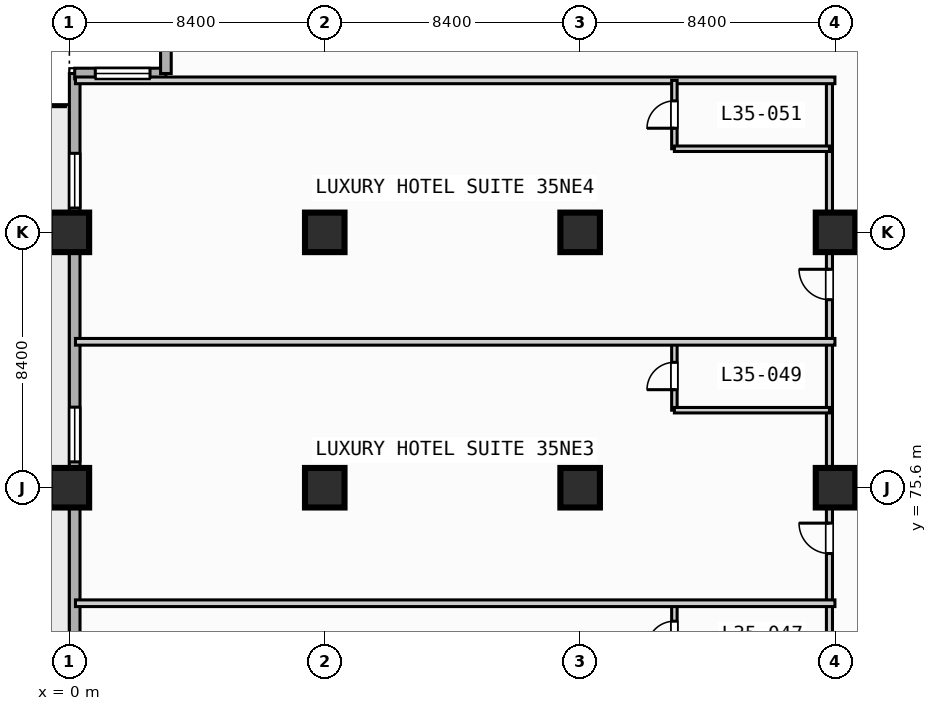
"""IFC4 building model, lengths in metres.
Left out: names, types, materials, properties, quantities, classifications, styles, units other than length and angle.
Written with IfcOpenShell. Run it as: python <this file> out.ifc"""

import sys

from ifc_helpers import new_model, si_unit, direction, frame, frame_2d, origin, origin_2d, place, context, subcontext, project, spatial, rectangle, extrude, element, fill, save


model = new_model("IFC4")
c1 = context("Model", 3, precision=1e-05, world=origin(), true_north=direction((0.0, 1.0)))
c2 = subcontext(c1, "Body", "Model", "MODEL_VIEW")
j1 = project(units=[si_unit("LENGTHUNIT", "METRE"), si_unit("PLANEANGLEUNIT", "RADIAN")], contexts=[c1])
p1 = place(None, origin())
s1 = spatial("IfcSite", under=j1, at=p1, CompositionType="ELEMENT")
p2 = place(p1, origin())
s2 = spatial("IfcBuilding", under=s1, at=p2, CompositionType="ELEMENT")
p3 = place(p2, frame((0.0, 0.0, 145.6)))
s3 = spatial("IfcBuildingStorey", under=s2, at=p3, CompositionType="ELEMENT", Elevation=145.6)
for number, where, z_axis, x_axis in (
    (1, (0.0, 75.6, 0.0), (0.0, 0.0, 1.0), (1.0, 0.0, 0.0)),
    (2, (0.0, 84.0, 0.0), (0.0, 0.0, 1.0), (1.0, 0.0, 0.0)),
    (3, (8.4, 75.6, 0.0), (0.0, 0.0, 1.0), (1.0, 0.0, 0.0)),
    (4, (8.4, 84.0, 0.0), (0.0, 0.0, 1.0), (1.0, 0.0, 0.0)),
    (5, (16.8, 75.6, 0.0), (0.0, 0.0, 1.0), (1.0, 0.0, 0.0)),
    (6, (16.8, 84.0, 0.0), (0.0, 0.0, 1.0), (1.0, 0.0, 0.0)),
    (7, (25.2, 75.6, 0.0), (0.0, 0.0, 1.0), (1.0, 0.0, 0.0)),
    (8, (25.2, 84.0, 0.0), (0.0, 0.0, 1.0), (1.0, 0.0, 0.0)),
):
    element("IfcColumn", number, at=place(p3, frame(where, z_axis=z_axis, x_axis=x_axis)), inside=s3, PredefinedType="COLUMN", context=c2, shape_type="SweptSolid", body=[
        extrude(rectangle(XDim=1.3, YDim=1.3, at=origin_2d()), origin(), (0.0, 0.0, 1.0), 3.8),
    ])
p4 = place(p3, frame((0.175, 3.175, 0.0), z_axis=(0.0, 0.0, 1.0), x_axis=(0.0, 1.0, 0.0)))
e9 = element("IfcWall", 9, at=p4, inside=s3, PredefinedType="STANDARD", context=c2, shape_type="SweptSolid", body=[
    extrude(rectangle(XDim=86.05, YDim=0.35, at=frame_2d((43.025, 0.0))), origin(), (0.0, 0.0, 1.0), 3.55),
])
p5 = place(p4, frame((42.325, 0.0, 0.0)))
e10 = element("IfcOpeningElement", 10, at=p5, cuts=e9, PredefinedType="OPENING", context=c2, shape_type="SweptSolid", body=[
    extrude(rectangle(XDim=1.4, YDim=2.2, at=frame_2d((0.7, 1.1))), frame((0.0, 0.185, 0.0), z_axis=(0.0, -1.0, 0.0), x_axis=(1.0, 0.0, 0.0)), (0.0, 0.0, 1.0), 0.37),
])
p6 = place(p4, frame((25.125, 0.0, 0.85)))
e11 = element("IfcOpeningElement", 11, at=p6, cuts=e9, PredefinedType="OPENING", context=c2, shape_type="SweptSolid", body=[
    extrude(rectangle(XDim=2.2, YDim=1.8, at=frame_2d((1.1, 0.9))), frame((0.0, 0.185, 0.0), z_axis=(0.0, -1.0, 0.0), x_axis=(1.0, 0.0, 0.0)), (0.0, 0.0, 1.0), 0.37),
])
p7 = place(p4, frame((33.525, 0.0, 0.85)))
e12 = element("IfcOpeningElement", 12, at=p7, cuts=e9, PredefinedType="OPENING", context=c2, shape_type="SweptSolid", body=[
    extrude(rectangle(XDim=2.2, YDim=1.8, at=frame_2d((1.1, 0.9))), frame((0.0, 0.185, 0.0), z_axis=(0.0, -1.0, 0.0), x_axis=(1.0, 0.0, 0.0)), (0.0, 0.0, 1.0), 0.37),
])
p8 = place(p4, frame((58.725, 0.0, 0.85)))
e13 = element("IfcOpeningElement", 13, at=p8, cuts=e9, PredefinedType="OPENING", context=c2, shape_type="SweptSolid", body=[
    extrude(rectangle(XDim=2.2, YDim=1.8, at=frame_2d((1.1, 0.9))), frame((0.0, 0.185, 0.0), z_axis=(0.0, -1.0, 0.0), x_axis=(1.0, 0.0, 0.0)), (0.0, 0.0, 1.0), 0.37),
])
p9 = place(p4, frame((65.125, 0.0, 0.85)))
e14 = element("IfcOpeningElement", 14, at=p9, cuts=e9, PredefinedType="OPENING", context=c2, shape_type="SweptSolid", body=[
    extrude(rectangle(XDim=1.8, YDim=1.8, at=frame_2d((0.9, 0.9))), frame((0.0, 0.185, 0.0), z_axis=(0.0, -1.0, 0.0), x_axis=(1.0, 0.0, 0.0)), (0.0, 0.0, 1.0), 0.37),
])
p10 = place(p4, frame((73.275, 0.0, 0.85)))
e15 = element("IfcOpeningElement", 15, at=p10, cuts=e9, PredefinedType="OPENING", context=c2, shape_type="SweptSolid", body=[
    extrude(rectangle(XDim=1.8, YDim=1.8, at=frame_2d((0.9, 0.9))), frame((0.0, 0.185, 0.0), z_axis=(0.0, -1.0, 0.0), x_axis=(1.0, 0.0, 0.0)), (0.0, 0.0, 1.0), 0.37),
])
p11 = place(p4, frame((81.625, 0.0, 0.85)))
e16 = element("IfcOpeningElement", 16, at=p11, cuts=e9, PredefinedType="OPENING", context=c2, shape_type="SweptSolid", body=[
    extrude(rectangle(XDim=1.8, YDim=1.8, at=frame_2d((0.9, 0.9))), frame((0.0, 0.185, 0.0), z_axis=(0.0, -1.0, 0.0), x_axis=(1.0, 0.0, 0.0)), (0.0, 0.0, 1.0), 0.37),
])
p12 = place(p3, frame((0.175, 89.225, 0.0), z_axis=(0.0, 0.0, 1.0), x_axis=(1.0, 0.0, 0.0)))
e17 = element("IfcWall", 17, at=p12, inside=s3, PredefinedType="STANDARD", context=c2, shape_type="SweptSolid", body=[
    extrude(rectangle(XDim=3.0, YDim=0.35, at=frame_2d((1.5, 0.0))), origin(), (0.0, 0.0, 1.0), 3.55),
])
p13 = place(p12, frame((0.677, 0.0, 0.85)))
e18 = element("IfcOpeningElement", 18, at=p13, cuts=e17, PredefinedType="OPENING", context=c2, shape_type="SweptSolid", body=[
    extrude(rectangle(XDim=1.8, YDim=1.8, at=frame_2d((0.9, 0.9))), frame((0.0, 0.185, 0.0), z_axis=(0.0, -1.0, 0.0), x_axis=(1.0, 0.0, 0.0)), (0.0, 0.0, 1.0), 0.37),
])
p14 = place(p3, frame((3.175, 89.225, 0.0), z_axis=(0.0, 0.0, 1.0), x_axis=(0.0, 1.0, 0.0)))
e19 = element("IfcWall", 19, at=p14, inside=s3, PredefinedType="STANDARD", context=c2, shape_type="SweptSolid", body=[
    extrude(rectangle(XDim=3.0, YDim=0.35, at=frame_2d((1.5, 0.0))), origin(), (0.0, 0.0, 1.0), 3.55),
])
p15 = place(p3, frame((25.0, 61.4, 0.0), z_axis=(0.0, 0.0, 1.0), x_axis=(0.0, 1.0, 0.0)))
e20 = element("IfcWall", 20, at=p15, inside=s3, PredefinedType="PARTITIONING", context=c2, shape_type="SweptSolid", body=[
    extrude(rectangle(XDim=27.6, YDim=0.2, at=frame_2d((13.8, 0.0))), origin(), (0.0, 0.0, 1.0), 2.8),
])
p16 = place(p15, frame((3.18, 0.0, 0.0)))
e21 = element("IfcOpeningElement", 21, at=p16, cuts=e20, PredefinedType="OPENING", context=c2, shape_type="SweptSolid", body=[
    extrude(rectangle(XDim=1.0, YDim=2.15, at=frame_2d((0.5, 1.075))), frame((0.0, 0.11, 0.0), z_axis=(0.0, -1.0, 0.0), x_axis=(1.0, 0.0, 0.0)), (0.0, 0.0, 1.0), 0.22),
])
p17 = place(p15, frame((6.97, 0.0, 0.0)))
e22 = element("IfcOpeningElement", 22, at=p17, cuts=e20, PredefinedType="OPENING", context=c2, shape_type="SweptSolid", body=[
    extrude(rectangle(XDim=1.0, YDim=2.15, at=frame_2d((0.5, 1.075))), frame((0.0, 0.11, 0.0), z_axis=(0.0, -1.0, 0.0), x_axis=(1.0, 0.0, 0.0)), (0.0, 0.0, 1.0), 0.22),
])
p18 = place(p15, frame((12.035, 0.0, 0.0)))
e23 = element("IfcOpeningElement", 23, at=p18, cuts=e20, PredefinedType="OPENING", context=c2, shape_type="SweptSolid", body=[
    extrude(rectangle(XDim=1.0, YDim=2.15, at=frame_2d((0.5, 1.075))), frame((0.0, 0.11, 0.0), z_axis=(0.0, -1.0, 0.0), x_axis=(1.0, 0.0, 0.0)), (0.0, 0.0, 1.0), 0.22),
])
p19 = place(p15, frame((20.385, 0.0, 0.0)))
e24 = element("IfcOpeningElement", 24, at=p19, cuts=e20, PredefinedType="OPENING", context=c2, shape_type="SweptSolid", body=[
    extrude(rectangle(XDim=1.0, YDim=2.15, at=frame_2d((0.5, 1.075))), frame((0.0, 0.11, 0.0), z_axis=(0.0, -1.0, 0.0), x_axis=(1.0, 0.0, 0.0)), (0.0, 0.0, 1.0), 0.22),
])
p20 = place(p3, frame((19.9, 69.72, 0.0), z_axis=(0.0, 0.0, 1.0), x_axis=(0.0, 1.0, 0.0)))
e25 = element("IfcWall", 25, at=p20, inside=s3, PredefinedType="PLUMBINGWALL", context=c2, shape_type="SweptSolid", body=[
    extrude(rectangle(XDim=2.08, YDim=0.18, at=frame_2d((1.04, 0.0))), origin(), (0.0, 0.0, 1.0), 3.55),
])
p21 = place(p20, frame((0.59, 0.0, 0.0)))
e26 = element("IfcOpeningElement", 26, at=p21, cuts=e25, PredefinedType="OPENING", context=c2, shape_type="SweptSolid", body=[
    extrude(rectangle(XDim=0.9, YDim=2.1, at=frame_2d((0.45, 1.05))), frame((0.0, 0.1, 0.0), z_axis=(0.0, -1.0, 0.0), x_axis=(1.0, 0.0, 0.0)), (0.0, 0.0, 1.0), 0.2),
])
p22 = place(p3, frame((0.2, 71.8, 0.0), z_axis=(0.0, 0.0, 1.0), x_axis=(1.0, 0.0, 0.0)))
e27 = element("IfcWall", 27, at=p22, inside=s3, PredefinedType="PARTITIONING", context=c2, shape_type="SweptSolid", body=[
    extrude(rectangle(XDim=24.98, YDim=0.22, at=frame_2d((12.49, 0.0))), origin(), (0.0, 0.0, 1.0), 3.55),
])
p23 = place(p3, frame((19.9, 78.15, 0.0), z_axis=(0.0, 0.0, 1.0), x_axis=(0.0, 1.0, 0.0)))
e28 = element("IfcWall", 28, at=p23, inside=s3, PredefinedType="PLUMBINGWALL", context=c2, shape_type="SweptSolid", body=[
    extrude(rectangle(XDim=2.25, YDim=0.18, at=frame_2d((1.125, 0.0))), origin(), (0.0, 0.0, 1.0), 3.55),
])
p24 = place(p23, frame((0.675, 0.0, 0.0)))
e29 = element("IfcOpeningElement", 29, at=p24, cuts=e28, PredefinedType="OPENING", context=c2, shape_type="SweptSolid", body=[
    extrude(rectangle(XDim=0.9, YDim=2.1, at=frame_2d((0.45, 1.05))), frame((0.0, 0.1, 0.0), z_axis=(0.0, -1.0, 0.0), x_axis=(1.0, 0.0, 0.0)), (0.0, 0.0, 1.0), 0.2),
])
p25 = place(p3, frame((19.9, 78.15, 0.0), z_axis=(0.0, 0.0, 1.0), x_axis=(1.0, 0.0, 0.0)))
e30 = element("IfcWall", 30, at=p25, inside=s3, PredefinedType="PLUMBINGWALL", context=c2, shape_type="SweptSolid", body=[
    extrude(rectangle(XDim=5.1, YDim=0.18, at=frame_2d((2.55, 0.0))), origin(), (0.0, 0.0, 1.0), 3.55),
])
for number, where, z_axis, x_axis in (
    (31, (0.2, 80.4, 0.0), (0.0, 0.0, 1.0), (1.0, 0.0, 0.0)),
    (32, (0.2, 89.0, 0.0), (0.0, 0.0, 1.0), (1.0, 0.0, 0.0)),
):
    element("IfcWall", number, at=place(p3, frame(where, z_axis=z_axis, x_axis=x_axis)), inside=s3, PredefinedType="PARTITIONING", context=c2, shape_type="SweptSolid", body=[
        extrude(rectangle(XDim=24.98, YDim=0.22, at=frame_2d((12.49, 0.0))), origin(), (0.0, 0.0, 1.0), 3.55),
    ])
p26 = place(p3, frame((19.9, 86.75, 0.0), z_axis=(0.0, 0.0, 1.0), x_axis=(0.0, 1.0, 0.0)))
e33 = element("IfcWall", 33, at=p26, inside=s3, PredefinedType="PLUMBINGWALL", context=c2, shape_type="SweptSolid", body=[
    extrude(rectangle(XDim=2.25, YDim=0.18, at=frame_2d((1.125, 0.0))), origin(), (0.0, 0.0, 1.0), 3.55),
])
p27 = place(p26, frame((0.675, 0.0, 0.0)))
e34 = element("IfcOpeningElement", 34, at=p27, cuts=e33, PredefinedType="OPENING", context=c2, shape_type="SweptSolid", body=[
    extrude(rectangle(XDim=0.9, YDim=2.1, at=frame_2d((0.45, 1.05))), frame((0.0, 0.1, 0.0), z_axis=(0.0, -1.0, 0.0), x_axis=(1.0, 0.0, 0.0)), (0.0, 0.0, 1.0), 0.2),
])
p28 = place(p3, frame((19.9, 86.75, 0.0), z_axis=(0.0, 0.0, 1.0), x_axis=(1.0, 0.0, 0.0)))
e35 = element("IfcWall", 35, at=p28, inside=s3, PredefinedType="PLUMBINGWALL", context=c2, shape_type="SweptSolid", body=[
    extrude(rectangle(XDim=5.1, YDim=0.18, at=frame_2d((2.55, 0.0))), origin(), (0.0, 0.0, 1.0), 3.55),
])
p29 = place(p10, origin())
e36 = element("IfcWindow", 36, at=p29, inside=s3, PartitioningType="SINGLE_PANEL", PredefinedType="WINDOW", context=c2, shape_type="SweptSolid", body=[
    extrude(rectangle(XDim=1.8, YDim=1.8, at=frame_2d((0.9, 0.9))), frame((0.0, 0.03, 0.0), z_axis=(0.0, -1.0, 0.0), x_axis=(1.0, 0.0, 0.0)), (0.0, 0.0, 1.0), 0.06),
])
fill(e15, e36)
p30 = place(p11, origin())
e37 = element("IfcWindow", 37, at=p30, inside=s3, PartitioningType="SINGLE_PANEL", PredefinedType="WINDOW", context=c2, shape_type="SweptSolid", body=[
    extrude(rectangle(XDim=1.8, YDim=1.8, at=frame_2d((0.9, 0.9))), frame((0.0, 0.03, 0.0), z_axis=(0.0, -1.0, 0.0), x_axis=(1.0, 0.0, 0.0)), (0.0, 0.0, 1.0), 0.06),
])
fill(e16, e37)
p31 = place(p13, origin())
e38 = element("IfcWindow", 38, at=p31, inside=s3, PartitioningType="SINGLE_PANEL", PredefinedType="WINDOW", context=c2, shape_type="SweptSolid", body=[
    extrude(rectangle(XDim=1.8, YDim=1.8, at=frame_2d((0.9, 0.9))), frame((0.0, 0.03, 0.0), z_axis=(0.0, -1.0, 0.0), x_axis=(1.0, 0.0, 0.0)), (0.0, 0.0, 1.0), 0.06),
])
fill(e18, e38)
p32 = place(p18, origin())
e39 = element("IfcDoor", 39, at=p32, inside=s3, OperationType="SINGLE_SWING_RIGHT", PredefinedType="DOOR", context=c2, shape_type="SweptSolid", body=[
    extrude(rectangle(XDim=1.0, YDim=2.15, at=frame_2d((0.5, 1.075))), frame((0.0, 0.025, 0.0), z_axis=(0.0, -1.0, 0.0), x_axis=(1.0, 0.0, 0.0)), (0.0, 0.0, 1.0), 0.05),
])
fill(e23, e39)
p33 = place(p19, origin())
e40 = element("IfcDoor", 40, at=p33, inside=s3, OperationType="SINGLE_SWING_RIGHT", PredefinedType="DOOR", context=c2, shape_type="SweptSolid", body=[
    extrude(rectangle(XDim=1.0, YDim=2.15, at=frame_2d((0.5, 1.075))), frame((0.0, 0.025, 0.0), z_axis=(0.0, -1.0, 0.0), x_axis=(1.0, 0.0, 0.0)), (0.0, 0.0, 1.0), 0.05),
])
fill(e24, e40)
p34 = place(p21, origin())
e41 = element("IfcDoor", 41, at=p34, inside=s3, OperationType="SINGLE_SWING_LEFT", PredefinedType="DOOR", context=c2, shape_type="SweptSolid", body=[
    extrude(rectangle(XDim=0.9, YDim=2.1, at=frame_2d((0.45, 1.05))), frame((0.0, 0.025, 0.0), z_axis=(0.0, -1.0, 0.0), x_axis=(1.0, 0.0, 0.0)), (0.0, 0.0, 1.0), 0.05),
])
fill(e26, e41)
p35 = place(p24, origin())
e42 = element("IfcDoor", 42, at=p35, inside=s3, OperationType="SINGLE_SWING_LEFT", PredefinedType="DOOR", context=c2, shape_type="SweptSolid", body=[
    extrude(rectangle(XDim=0.9, YDim=2.1, at=frame_2d((0.45, 1.05))), frame((0.0, 0.025, 0.0), z_axis=(0.0, -1.0, 0.0), x_axis=(1.0, 0.0, 0.0)), (0.0, 0.0, 1.0), 0.05),
])
fill(e29, e42)
p36 = place(p27, origin())
e43 = element("IfcDoor", 43, at=p36, inside=s3, OperationType="SINGLE_SWING_LEFT", PredefinedType="DOOR", context=c2, shape_type="SweptSolid", body=[
    extrude(rectangle(XDim=0.9, YDim=2.1, at=frame_2d((0.45, 1.05))), frame((0.0, 0.025, 0.0), z_axis=(0.0, -1.0, 0.0), x_axis=(1.0, 0.0, 0.0)), (0.0, 0.0, 1.0), 0.05),
])
fill(e34, e43)
save(model, sys.argv[1])
